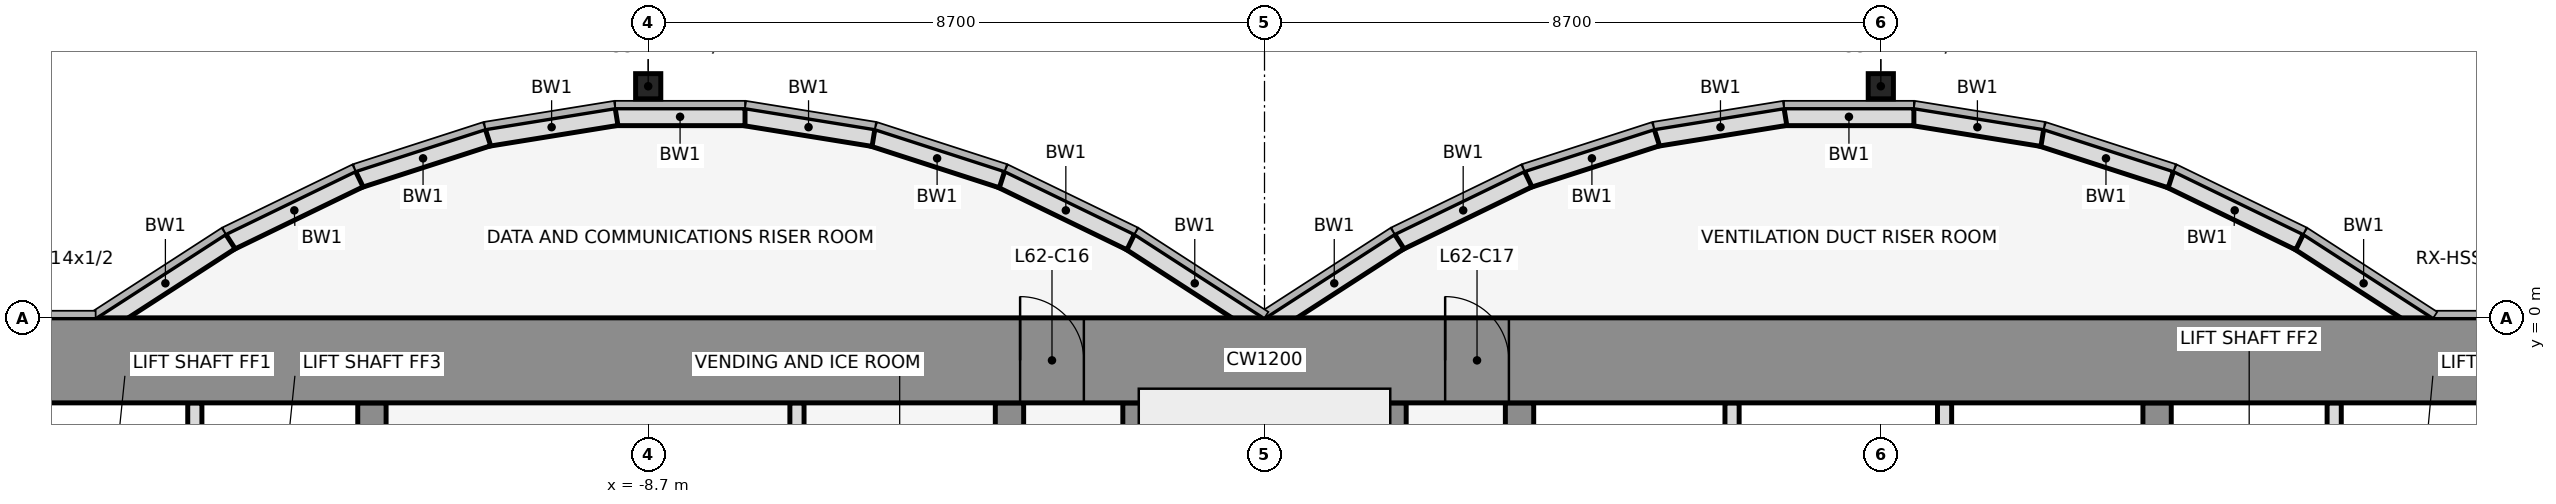
"""IFC4 building model, lengths in metres.
Left out: names, types, materials, properties, quantities, classifications, styles, units other than length and angle.
Written with IfcOpenShell. Run it as: python <this file> out.ifc"""

import sys

from ifc_helpers import new_model, si_unit, direction, frame, frame_2d, origin, origin_2d, place, context, subcontext, project, spatial, rectangle, hollow_rectangle, extrude, element, fill, save


model = new_model("IFC4")
c1 = context("Model", 3, precision=1e-05, world=origin(), true_north=direction((0.0, 1.0)))
c2 = subcontext(c1, "Body", "Model", "MODEL_VIEW")
j1 = project(units=[si_unit("LENGTHUNIT", "METRE"), si_unit("PLANEANGLEUNIT", "RADIAN")], contexts=[c1])
p1 = place(None, origin())
s1 = spatial("IfcSite", under=j1, at=p1, CompositionType="ELEMENT")
p2 = place(p1, origin())
s2 = spatial("IfcBuilding", under=s1, at=p2, CompositionType="ELEMENT")
p3 = place(p2, frame((0.0, 0.0, 275.0)))
s3 = spatial("IfcBuildingStorey", under=s2, at=p3, CompositionType="ELEMENT", Elevation=275.0)
for number, where, z_axis, x_axis in (
    (1, (-8.7, 3.269, 0.0), (0.0, 0.0, 1.0), (1.0, 0.0, 0.0)),
    (2, (8.7, 3.269, 0.0), (0.0, 0.0, 1.0), (1.0, 0.0, 0.0)),
):
    element("IfcColumn", number, at=place(p3, frame(where, z_axis=z_axis, x_axis=x_axis)), inside=s3, PredefinedType="COLUMN", context=c2, shape_type="SweptSolid", body=[
        extrude(hollow_rectangle(XDim=0.356, YDim=0.356, WallThickness=0.012, at=origin_2d()), origin(), (0.0, 0.0, 1.0), 4.2),
    ])
p4 = place(p3, frame((16.432, -0.105, 0.0), z_axis=(0.0, 0.0, 1.0), x_axis=(-0.83981312244, 0.542875602121, 0.0)))
e3 = element("IfcWall", 3, at=p4, inside=s3, PredefinedType="STANDARD", context=c2, shape_type="SweptSolid", body=[
    extrude(rectangle(XDim=2.183, YDim=0.25, at=frame_2d((1.091, 0.0))), origin(), (0.0, 0.0, 1.0), 4.05),
])
p5 = place(p3, frame((14.612, 1.073, 0.0), z_axis=(0.0, 0.0, 1.0), x_axis=(-0.89982408427, 0.436252928206, 0.0)))
e4 = element("IfcWall", 4, at=p5, inside=s3, PredefinedType="STANDARD", context=c2, shape_type="SweptSolid", body=[
    extrude(rectangle(XDim=2.038, YDim=0.25, at=frame_2d((1.019, 0.0))), origin(), (0.0, 0.0, 1.0), 4.05),
])
p6 = place(p3, frame((12.795, 1.955, 0.0), z_axis=(0.0, 0.0, 1.0), x_axis=(-0.951495806175, 0.307661714928, 0.0)))
e5 = element("IfcWall", 5, at=p6, inside=s3, PredefinedType="STANDARD", context=c2, shape_type="SweptSolid", body=[
    extrude(rectangle(XDim=1.927, YDim=0.25, at=frame_2d((0.963, 0.0))), origin(), (0.0, 0.0, 1.0), 4.05),
])
p7 = place(p3, frame((10.98, 2.543, 0.0), z_axis=(0.0, 0.0, 1.0), x_axis=(-0.987181718931, 0.159600293885, 0.0)))
e6 = element("IfcWall", 6, at=p7, inside=s3, PredefinedType="STANDARD", context=c2, shape_type="SweptSolid", body=[
    extrude(rectangle(XDim=1.857, YDim=0.25, at=frame_2d((0.929, 0.0))), origin(), (0.0, 0.0, 1.0), 4.05),
])
p8 = place(p3, frame((9.167, 2.838, 0.0), z_axis=(0.0, 0.0, 1.0), x_axis=(-1.0, 0.0, 0.0)))
e7 = element("IfcWall", 7, at=p8, inside=s3, PredefinedType="STANDARD", context=c2, shape_type="SweptSolid", body=[
    extrude(rectangle(XDim=1.833, YDim=0.25, at=frame_2d((0.917, 0.0))), origin(), (0.0, 0.0, 1.0), 4.05),
])
p9 = place(p3, frame((7.353, 2.84, 0.0), z_axis=(0.0, 0.0, 1.0), x_axis=(-0.987181718931, -0.159600293885, 0.0)))
e8 = element("IfcWall", 8, at=p9, inside=s3, PredefinedType="STANDARD", context=c2, shape_type="SweptSolid", body=[
    extrude(rectangle(XDim=1.857, YDim=0.25, at=frame_2d((0.929, 0.0))), origin(), (0.0, 0.0, 1.0), 4.05),
])
p10 = place(p3, frame((5.538, 2.548, 0.0), z_axis=(0.0, 0.0, 1.0), x_axis=(-0.951495806175, -0.307661714928, 0.0)))
e9 = element("IfcWall", 9, at=p10, inside=s3, PredefinedType="STANDARD", context=c2, shape_type="SweptSolid", body=[
    extrude(rectangle(XDim=1.927, YDim=0.25, at=frame_2d((0.963, 0.0))), origin(), (0.0, 0.0, 1.0), 4.05),
])
p11 = place(p3, frame((3.721, 1.962, 0.0), z_axis=(0.0, 0.0, 1.0), x_axis=(-0.89982408427, -0.436252928206, 0.0)))
e10 = element("IfcWall", 10, at=p11, inside=s3, PredefinedType="STANDARD", context=c2, shape_type="SweptSolid", body=[
    extrude(rectangle(XDim=2.038, YDim=0.25, at=frame_2d((1.019, 0.0))), origin(), (0.0, 0.0, 1.0), 4.05),
])
for number, where, z_axis, x_axis in (
    (11, (1.901, 1.08, 0.0), (0.0, 0.0, 1.0), (-0.84, -0.543, 0.0)),
    (12, (-0.068, -0.105, 0.0), (0.0, 0.0, 1.0), (-0.84, 0.543, 0.0)),
):
    element("IfcWall", number, at=place(p3, frame(where, z_axis=z_axis, x_axis=x_axis)), inside=s3, PredefinedType="STANDARD", context=c2, shape_type="SweptSolid", body=[
        extrude(rectangle(XDim=2.183, YDim=0.25, at=frame_2d((1.091, 0.0))), origin(), (0.0, 0.0, 1.0), 4.05),
    ])
p12 = place(p3, frame((-1.888, 1.073, 0.0), z_axis=(0.0, 0.0, 1.0), x_axis=(-0.89982408427, 0.436252928206, 0.0)))
e13 = element("IfcWall", 13, at=p12, inside=s3, PredefinedType="STANDARD", context=c2, shape_type="SweptSolid", body=[
    extrude(rectangle(XDim=2.038, YDim=0.25, at=frame_2d((1.019, 0.0))), origin(), (0.0, 0.0, 1.0), 4.05),
])
p13 = place(p3, frame((-3.705, 1.955, 0.0), z_axis=(0.0, 0.0, 1.0), x_axis=(-0.951495806175, 0.307661714928, 0.0)))
e14 = element("IfcWall", 14, at=p13, inside=s3, PredefinedType="STANDARD", context=c2, shape_type="SweptSolid", body=[
    extrude(rectangle(XDim=1.927, YDim=0.25, at=frame_2d((0.963, 0.0))), origin(), (0.0, 0.0, 1.0), 4.05),
])
p14 = place(p3, frame((-5.52, 2.543, 0.0), z_axis=(0.0, 0.0, 1.0), x_axis=(-0.987181718931, 0.159600293885, 0.0)))
e15 = element("IfcWall", 15, at=p14, inside=s3, PredefinedType="STANDARD", context=c2, shape_type="SweptSolid", body=[
    extrude(rectangle(XDim=1.857, YDim=0.25, at=frame_2d((0.929, 0.0))), origin(), (0.0, 0.0, 1.0), 4.05),
])
p15 = place(p3, frame((-7.333, 2.838, 0.0), z_axis=(0.0, 0.0, 1.0), x_axis=(-1.0, 0.0, 0.0)))
e16 = element("IfcWall", 16, at=p15, inside=s3, PredefinedType="STANDARD", context=c2, shape_type="SweptSolid", body=[
    extrude(rectangle(XDim=1.833, YDim=0.25, at=frame_2d((0.917, 0.0))), origin(), (0.0, 0.0, 1.0), 4.05),
])
p16 = place(p3, frame((-9.147, 2.84, 0.0), z_axis=(0.0, 0.0, 1.0), x_axis=(-0.987181718931, -0.159600293885, 0.0)))
e17 = element("IfcWall", 17, at=p16, inside=s3, PredefinedType="STANDARD", context=c2, shape_type="SweptSolid", body=[
    extrude(rectangle(XDim=1.857, YDim=0.25, at=frame_2d((0.929, 0.0))), origin(), (0.0, 0.0, 1.0), 4.05),
])
p17 = place(p3, frame((-10.962, 2.548, 0.0), z_axis=(0.0, 0.0, 1.0), x_axis=(-0.951495806175, -0.307661714928, 0.0)))
e18 = element("IfcWall", 18, at=p17, inside=s3, PredefinedType="STANDARD", context=c2, shape_type="SweptSolid", body=[
    extrude(rectangle(XDim=1.927, YDim=0.25, at=frame_2d((0.963, 0.0))), origin(), (0.0, 0.0, 1.0), 4.05),
])
p18 = place(p3, frame((-12.779, 1.962, 0.0), z_axis=(0.0, 0.0, 1.0), x_axis=(-0.89982408427, -0.436252928206, 0.0)))
e19 = element("IfcWall", 19, at=p18, inside=s3, PredefinedType="STANDARD", context=c2, shape_type="SweptSolid", body=[
    extrude(rectangle(XDim=2.038, YDim=0.25, at=frame_2d((1.019, 0.0))), origin(), (0.0, 0.0, 1.0), 4.05),
])
p19 = place(p3, frame((-14.599, 1.08, 0.0), z_axis=(0.0, 0.0, 1.0), x_axis=(-0.83981312244, -0.542875602121, 0.0)))
e20 = element("IfcWall", 20, at=p19, inside=s3, PredefinedType="STANDARD", context=c2, shape_type="SweptSolid", body=[
    extrude(rectangle(XDim=2.183, YDim=0.25, at=frame_2d((1.091, 0.0))), origin(), (0.0, 0.0, 1.0), 4.05),
])
p20 = place(p3, frame((-15.1, -4.6, 0.0), z_axis=(0.0, 0.0, 1.0), x_axis=(0.0, 1.0, 0.0)))
e21 = element("IfcWall", 21, at=p20, inside=s3, PredefinedType="PARTITIONING", context=c2, shape_type="SweptSolid", body=[
    extrude(rectangle(XDim=3.4, YDim=0.2, at=frame_2d((1.7, 0.0))), origin(), (0.0, 0.0, 1.0), 3.118),
])
p21 = place(p3, frame((-12.6, -11.8, 0.0), z_axis=(0.0, 0.0, 1.0), x_axis=(0.0, 1.0, 0.0)))
e22 = element("IfcWall", 22, at=p21, inside=s3, PredefinedType="SHEAR", context=c2, shape_type="SweptSolid", body=[
    extrude(rectangle(XDim=10.6, YDim=0.4, at=frame_2d((5.3, 0.0))), origin(), (0.0, 0.0, 1.0), 4.2),
])
p22 = place(p21, frame((4.75, 0.0, 0.0)))
e23 = element("IfcOpeningElement", 23, at=p22, cuts=e22, PredefinedType="OPENING", context=c2, shape_type="SweptSolid", body=[
    extrude(rectangle(XDim=1.1, YDim=2.1, at=frame_2d((0.55, 1.05))), frame((0.0, 0.212, 0.0), z_axis=(0.0, -1.0, 0.0), x_axis=(1.0, 0.0, 0.0)), (0.0, 0.0, 1.0), 0.424),
])
p23 = place(p3, frame((-6.6, -4.6, 0.0), z_axis=(0.0, 0.0, 1.0), x_axis=(0.0, 1.0, 0.0)))
e24 = element("IfcWall", 24, at=p23, inside=s3, PredefinedType="PARTITIONING", context=c2, shape_type="SweptSolid", body=[
    extrude(rectangle(XDim=3.4, YDim=0.2, at=frame_2d((1.7, 0.0))), origin(), (0.0, 0.0, 1.0), 3.118),
])
p24 = place(p3, frame((-3.6, -11.8, 0.0), z_axis=(0.0, 0.0, 1.0), x_axis=(0.0, 1.0, 0.0)))
e25 = element("IfcWall", 25, at=p24, inside=s3, PredefinedType="SHEAR", context=c2, shape_type="SweptSolid", body=[
    extrude(rectangle(XDim=10.6, YDim=0.4, at=frame_2d((5.3, 0.0))), origin(), (0.0, 0.0, 1.0), 4.2),
])
p25 = place(p24, frame((4.85, 0.0, 0.0)))
e26 = element("IfcOpeningElement", 26, at=p25, cuts=e25, PredefinedType="OPENING", context=c2, shape_type="SweptSolid", body=[
    extrude(rectangle(XDim=0.9, YDim=2.1, at=frame_2d((0.45, 1.05))), frame((0.0, 0.212, 0.0), z_axis=(0.0, -1.0, 0.0), x_axis=(1.0, 0.0, 0.0)), (0.0, 0.0, 1.0), 0.424),
])
for number, where, z_axis, x_axis in (
    (27, (-1.8, -11.8, 0.0), (0.0, 0.0, 1.0), (0.0, 1.0, 0.0)),
    (28, (1.8, -11.8, 0.0), (0.0, 0.0, 1.0), (0.0, 1.0, 0.0)),
):
    element("IfcWall", number, at=place(p3, frame(where, z_axis=z_axis, x_axis=x_axis)), inside=s3, PredefinedType="SHEAR", context=c2, shape_type="SweptSolid", body=[
        extrude(rectangle(XDim=10.6, YDim=0.4, at=frame_2d((5.3, 0.0))), origin(), (0.0, 0.0, 1.0), 4.2),
    ])
p26 = place(p3, frame((3.6, -11.8, 0.0), z_axis=(0.0, 0.0, 1.0), x_axis=(0.0, 1.0, 0.0)))
e29 = element("IfcWall", 29, at=p26, inside=s3, PredefinedType="SHEAR", context=c2, shape_type="SweptSolid", body=[
    extrude(rectangle(XDim=10.6, YDim=0.4, at=frame_2d((5.3, 0.0))), origin(), (0.0, 0.0, 1.0), 4.2),
])
p27 = place(p26, frame((1.35, 0.0, 0.0)))
e30 = element("IfcOpeningElement", 30, at=p27, cuts=e29, PredefinedType="OPENING", context=c2, shape_type="SweptSolid", body=[
    extrude(rectangle(XDim=0.9, YDim=2.1, at=frame_2d((0.45, 1.05))), frame((0.0, 0.212, 0.0), z_axis=(0.0, -1.0, 0.0), x_axis=(1.0, 0.0, 0.0)), (0.0, 0.0, 1.0), 0.424),
])
for number, where, z_axis, x_axis in (
    (31, (6.6, -4.6, 0.0), (0.0, 0.0, 1.0), (0.0, 1.0, 0.0)),
    (32, (9.6, -4.6, 0.0), (0.0, 0.0, 1.0), (0.0, 1.0, 0.0)),
):
    element("IfcWall", number, at=place(p3, frame(where, z_axis=z_axis, x_axis=x_axis)), inside=s3, PredefinedType="PARTITIONING", context=c2, shape_type="SweptSolid", body=[
        extrude(rectangle(XDim=3.4, YDim=0.2, at=frame_2d((1.7, 0.0))), origin(), (0.0, 0.0, 1.0), 3.118),
    ])
p28 = place(p3, frame((12.6, -11.8, 0.0), z_axis=(0.0, 0.0, 1.0), x_axis=(0.0, 1.0, 0.0)))
e33 = element("IfcWall", 33, at=p28, inside=s3, PredefinedType="SHEAR", context=c2, shape_type="SweptSolid", body=[
    extrude(rectangle(XDim=10.6, YDim=0.4, at=frame_2d((5.3, 0.0))), origin(), (0.0, 0.0, 1.0), 4.2),
])
p29 = place(p28, frame((4.75, 0.0, 0.0)))
e34 = element("IfcOpeningElement", 34, at=p29, cuts=e33, PredefinedType="OPENING", context=c2, shape_type="SweptSolid", body=[
    extrude(rectangle(XDim=1.1, YDim=2.1, at=frame_2d((0.55, 1.05))), frame((0.0, 0.212, 0.0), z_axis=(0.0, -1.0, 0.0), x_axis=(1.0, 0.0, 0.0)), (0.0, 0.0, 1.0), 0.424),
])
p30 = place(p3, frame((15.1, -4.6, 0.0), z_axis=(0.0, 0.0, 1.0), x_axis=(0.0, 1.0, 0.0)))
e35 = element("IfcWall", 35, at=p30, inside=s3, PredefinedType="PARTITIONING", context=c2, shape_type="SweptSolid", body=[
    extrude(rectangle(XDim=3.4, YDim=0.2, at=frame_2d((1.7, 0.0))), origin(), (0.0, 0.0, 1.0), 3.118),
])
p31 = place(p3, frame((-22.0, -0.6, 0.0), z_axis=(0.0, 0.0, 1.0), x_axis=(1.0, 0.0, 0.0)))
e36 = element("IfcWall", 36, at=p31, inside=s3, PredefinedType="SHEAR", context=c2, shape_type="SweptSolid", body=[
    extrude(rectangle(XDim=44.0, YDim=1.2, at=frame_2d((22.0, 0.0))), origin(), (0.0, 0.0, 1.0), 4.2),
])
p32 = place(p31, frame((18.55, 0.0, 0.0)))
e37 = element("IfcOpeningElement", 37, at=p32, cuts=e36, PredefinedType="OPENING", context=c2, shape_type="SweptSolid", body=[
    extrude(rectangle(XDim=0.9, YDim=2.1, at=frame_2d((0.45, 1.05))), frame((0.0, 0.612, 0.0), z_axis=(0.0, -1.0, 0.0), x_axis=(1.0, 0.0, 0.0)), (0.0, 0.0, 1.0), 1.224),
])
p33 = place(p31, frame((24.55, 0.0, 0.0)))
e38 = element("IfcOpeningElement", 38, at=p33, cuts=e36, PredefinedType="OPENING", context=c2, shape_type="SweptSolid", body=[
    extrude(rectangle(XDim=0.9, YDim=2.1, at=frame_2d((0.45, 1.05))), frame((0.0, 0.612, 0.0), z_axis=(0.0, -1.0, 0.0), x_axis=(1.0, 0.0, 0.0)), (0.0, 0.0, 1.0), 1.224),
])
p34 = place(p32, origin())
e39 = element("IfcDoor", 39, at=p34, inside=s3, OperationType="SINGLE_SWING_LEFT", PredefinedType="DOOR", context=c2, shape_type="SweptSolid", body=[
    extrude(rectangle(XDim=0.9, YDim=2.1, at=frame_2d((0.45, 1.05))), frame((0.0, 0.025, 0.0), z_axis=(0.0, -1.0, 0.0), x_axis=(1.0, 0.0, 0.0)), (0.0, 0.0, 1.0), 0.05),
])
fill(e37, e39)
p35 = place(p33, origin())
e40 = element("IfcDoor", 40, at=p35, inside=s3, OperationType="SINGLE_SWING_LEFT", PredefinedType="DOOR", context=c2, shape_type="SweptSolid", body=[
    extrude(rectangle(XDim=0.9, YDim=2.1, at=frame_2d((0.45, 1.05))), frame((0.0, 0.025, 0.0), z_axis=(0.0, -1.0, 0.0), x_axis=(1.0, 0.0, 0.0)), (0.0, 0.0, 1.0), 0.05),
])
fill(e38, e40)
save(model, sys.argv[1])
